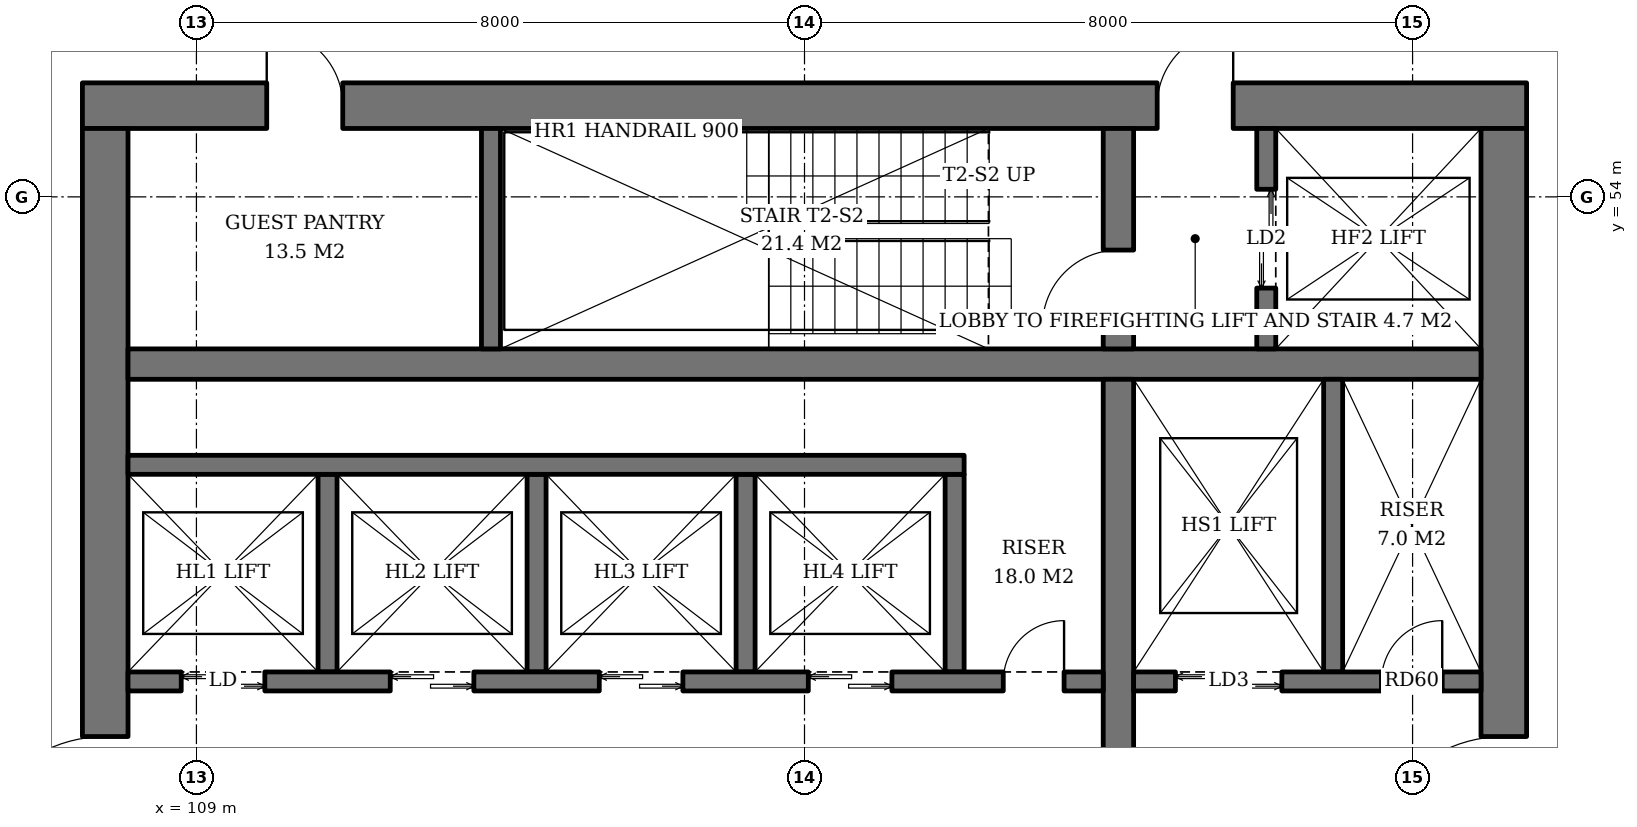
"""IFC4 building model, lengths in metres.
Left out: names, types, materials, properties, quantities, classifications, styles, units other than length and angle.
Written with IfcOpenShell. Run it as: python <this file> out.ifc"""

import sys

from ifc_helpers import new_model, si_unit, direction, frame, frame_2d, origin, place, context, subcontext, project, spatial, rectangle, extrude, element, fill, save


model = new_model("IFC4")
c1 = context("Model", 3, precision=1e-05, world=origin(), true_north=direction((0.0, 1.0)))
c2 = subcontext(c1, "Body", "Model", "MODEL_VIEW")
j1 = project(units=[si_unit("LENGTHUNIT", "METRE"), si_unit("PLANEANGLEUNIT", "RADIAN")], contexts=[c1])
p1 = place(None, origin())
s1 = spatial("IfcSite", under=j1, at=p1, CompositionType="ELEMENT")
p2 = place(p1, origin())
s2 = spatial("IfcBuilding", under=s1, at=p2, CompositionType="ELEMENT")
p3 = place(p2, frame((0.0, 0.0, 119.8)))
s3 = spatial("IfcBuildingStorey", under=s2, at=p3, CompositionType="ELEMENT", Elevation=119.8)
p4 = place(p3, frame((107.5, 55.2, 0.0), z_axis=(0.0, 0.0, 1.0), x_axis=(1.0, 0.0, 0.0)))
e1 = element("IfcWall", 1, at=p4, inside=s3, PredefinedType="SHEAR", context=c2, shape_type="SweptSolid", body=[
    extrude(rectangle(XDim=19.0, YDim=0.6, at=frame_2d((9.5, 0.0))), origin(), (0.0, 0.0, 1.0), 3.8),
])
p5 = place(p4, frame((14.14, 0.0, 0.0)))
e2 = element("IfcOpeningElement", 2, at=p5, cuts=e1, PredefinedType="OPENING", context=c2, shape_type="SweptSolid", body=[
    extrude(rectangle(XDim=1.0, YDim=2.1, at=frame_2d((0.5, 1.05))), frame((0.0, 0.31, 0.0), z_axis=(0.0, -1.0, 0.0), x_axis=(1.0, 0.0, 0.0)), (0.0, 0.0, 1.0), 0.62),
])
p6 = place(p4, frame((2.425, 0.0, 0.0)))
e3 = element("IfcOpeningElement", 3, at=p6, cuts=e1, PredefinedType="OPENING", context=c2, shape_type="SweptSolid", body=[
    extrude(rectangle(XDim=1.0, YDim=2.1, at=frame_2d((0.5, 1.05))), frame((0.0, 0.31, 0.0), z_axis=(0.0, -1.0, 0.0), x_axis=(1.0, 0.0, 0.0)), (0.0, 0.0, 1.0), 0.62),
])
p7 = place(p3, frame((107.8, 37.1, 0.0), z_axis=(0.0, 0.0, 1.0), x_axis=(0.0, 1.0, 0.0)))
e4 = element("IfcWall", 4, at=p7, inside=s3, PredefinedType="SHEAR", context=c2, shape_type="SweptSolid", body=[
    extrude(rectangle(XDim=17.8, YDim=0.6, at=frame_2d((8.9, 0.0))), origin(), (0.0, 0.0, 1.0), 3.8),
])
p8 = place(p7, frame((8.0, 0.0, 0.0)))
e5 = element("IfcOpeningElement", 5, at=p8, cuts=e4, PredefinedType="OPENING", context=c2, shape_type="SweptSolid", body=[
    extrude(rectangle(XDim=1.8, YDim=2.4, at=frame_2d((0.9, 1.2))), frame((0.0, 0.31, 0.0), z_axis=(0.0, -1.0, 0.0), x_axis=(1.0, 0.0, 0.0)), (0.0, 0.0, 1.0), 0.62),
])
p9 = place(p3, frame((126.2, 37.1, 0.0), z_axis=(0.0, 0.0, 1.0), x_axis=(0.0, 1.0, 0.0)))
e6 = element("IfcWall", 6, at=p9, inside=s3, PredefinedType="SHEAR", context=c2, shape_type="SweptSolid", body=[
    extrude(rectangle(XDim=17.8, YDim=0.6, at=frame_2d((8.9, 0.0))), origin(), (0.0, 0.0, 1.0), 3.8),
])
p10 = place(p9, frame((8.0, 0.0, 0.0)))
e7 = element("IfcOpeningElement", 7, at=p10, cuts=e6, PredefinedType="OPENING", context=c2, shape_type="SweptSolid", body=[
    extrude(rectangle(XDim=1.8, YDim=2.4, at=frame_2d((0.9, 1.2))), frame((0.0, 0.31, 0.0), z_axis=(0.0, -1.0, 0.0), x_axis=(1.0, 0.0, 0.0)), (0.0, 0.0, 1.0), 0.62),
])
p11 = place(p3, frame((108.1, 51.8, 0.0), z_axis=(0.0, 0.0, 1.0), x_axis=(1.0, 0.0, 0.0)))
e8 = element("IfcWall", 8, at=p11, inside=s3, PredefinedType="SHEAR", context=c2, shape_type="SweptSolid", body=[
    extrude(rectangle(XDim=17.8, YDim=0.4, at=frame_2d((8.9, 0.0))), origin(), (0.0, 0.0, 1.0), 3.8),
])
p12 = place(p3, frame((121.13, 40.4, 0.0), z_axis=(0.0, 0.0, 1.0), x_axis=(0.0, 1.0, 0.0)))
e9 = element("IfcWall", 9, at=p12, inside=s3, PredefinedType="SHEAR", context=c2, shape_type="SweptSolid", body=[
    extrude(rectangle(XDim=11.2, YDim=0.4, at=frame_2d((5.6, 0.0))), origin(), (0.0, 0.0, 1.0), 3.8),
])
p13 = place(p3, frame((121.13, 52.0, 0.0), z_axis=(0.0, 0.0, 1.0), x_axis=(0.0, 1.0, 0.0)))
e10 = element("IfcWall", 10, at=p13, inside=s3, PredefinedType="SHEAR", context=c2, shape_type="SweptSolid", body=[
    extrude(rectangle(XDim=2.9, YDim=0.4, at=frame_2d((1.45, 0.0))), origin(), (0.0, 0.0, 1.0), 3.8),
])
p14 = place(p13, frame((0.3, 0.0, 0.0)))
e11 = element("IfcOpeningElement", 11, at=p14, cuts=e10, PredefinedType="OPENING", context=c2, shape_type="SweptSolid", body=[
    extrude(rectangle(XDim=1.0, YDim=2.1, at=frame_2d((0.5, 1.05))), frame((0.0, 0.21, 0.0), z_axis=(0.0, -1.0, 0.0), x_axis=(1.0, 0.0, 0.0)), (0.0, 0.0, 1.0), 0.42),
])
p15 = place(p3, frame((112.875, 52.0, 0.0), z_axis=(0.0, 0.0, 1.0), x_axis=(0.0, 1.0, 0.0)))
e12 = element("IfcWall", 12, at=p15, inside=s3, PredefinedType="SHEAR", context=c2, shape_type="SweptSolid", body=[
    extrude(rectangle(XDim=2.9, YDim=0.25, at=frame_2d((1.45, 0.0))), origin(), (0.0, 0.0, 1.0), 3.8),
])
p16 = place(p3, frame((123.075, 52.0, 0.0), z_axis=(0.0, 0.0, 1.0), x_axis=(0.0, 1.0, 0.0)))
e13 = element("IfcWall", 13, at=p16, inside=s3, PredefinedType="SHEAR", context=c2, shape_type="SweptSolid", body=[
    extrude(rectangle(XDim=2.9, YDim=0.25, at=frame_2d((1.45, 0.0))), origin(), (0.0, 0.0, 1.0), 3.8),
])
p17 = place(p16, frame((0.8, 0.0, 0.0)))
e14 = element("IfcOpeningElement", 14, at=p17, cuts=e13, PredefinedType="OPENING", context=c2, shape_type="SweptSolid", body=[
    extrude(rectangle(XDim=1.3, YDim=2.2, at=frame_2d((0.65, 1.1))), frame((0.0, 0.135, 0.0), z_axis=(0.0, -1.0, 0.0), x_axis=(1.0, 0.0, 0.0)), (0.0, 0.0, 1.0), 0.27),
])
for number, where, z_axis, x_axis in (
    (15, (110.725, 47.75, 0.0), (0.0, 0.0, 1.0), (0.0, 1.0, 0.0)),
    (16, (113.475, 47.75, 0.0), (0.0, 0.0, 1.0), (0.0, 1.0, 0.0)),
    (17, (116.225, 47.75, 0.0), (0.0, 0.0, 1.0), (0.0, 1.0, 0.0)),
    (18, (118.975, 47.75, 0.0), (0.0, 0.0, 1.0), (0.0, 1.0, 0.0)),
):
    element("IfcWall", number, at=place(p3, frame(where, z_axis=z_axis, x_axis=x_axis)), inside=s3, PredefinedType="SHEAR", context=c2, shape_type="SweptSolid", body=[
        extrude(rectangle(XDim=2.6, YDim=0.25, at=frame_2d((1.3, 0.0))), origin(), (0.0, 0.0, 1.0), 3.8),
    ])
p18 = place(p3, frame((108.1, 50.475, 0.0), z_axis=(0.0, 0.0, 1.0), x_axis=(1.0, 0.0, 0.0)))
e19 = element("IfcWall", 19, at=p18, inside=s3, PredefinedType="SHEAR", context=c2, shape_type="SweptSolid", body=[
    extrude(rectangle(XDim=11.0, YDim=0.25, at=frame_2d((5.5, 0.0))), origin(), (0.0, 0.0, 1.0), 3.8),
])
p19 = place(p3, frame((108.1, 47.625, 0.0), z_axis=(0.0, 0.0, 1.0), x_axis=(1.0, 0.0, 0.0)))
e20 = element("IfcWall", 20, at=p19, inside=s3, PredefinedType="SHEAR", context=c2, shape_type="SweptSolid", body=[
    extrude(rectangle(XDim=12.83, YDim=0.25, at=frame_2d((6.415, 0.0))), origin(), (0.0, 0.0, 1.0), 3.8),
])
p20 = place(p19, frame((0.7, 0.0, 0.0)))
e21 = element("IfcOpeningElement", 21, at=p20, cuts=e20, PredefinedType="OPENING", context=c2, shape_type="SweptSolid", body=[
    extrude(rectangle(XDim=1.1, YDim=2.2, at=frame_2d((0.55, 1.1))), frame((0.0, 0.135, 0.0), z_axis=(0.0, -1.0, 0.0), x_axis=(1.0, 0.0, 0.0)), (0.0, 0.0, 1.0), 0.27),
])
p21 = place(p19, frame((3.45, 0.0, 0.0)))
e22 = element("IfcOpeningElement", 22, at=p21, cuts=e20, PredefinedType="OPENING", context=c2, shape_type="SweptSolid", body=[
    extrude(rectangle(XDim=1.1, YDim=2.2, at=frame_2d((0.55, 1.1))), frame((0.0, 0.135, 0.0), z_axis=(0.0, -1.0, 0.0), x_axis=(1.0, 0.0, 0.0)), (0.0, 0.0, 1.0), 0.27),
])
p22 = place(p19, frame((6.2, 0.0, 0.0)))
e23 = element("IfcOpeningElement", 23, at=p22, cuts=e20, PredefinedType="OPENING", context=c2, shape_type="SweptSolid", body=[
    extrude(rectangle(XDim=1.1, YDim=2.2, at=frame_2d((0.55, 1.1))), frame((0.0, 0.135, 0.0), z_axis=(0.0, -1.0, 0.0), x_axis=(1.0, 0.0, 0.0)), (0.0, 0.0, 1.0), 0.27),
])
p23 = place(p19, frame((8.95, 0.0, 0.0)))
e24 = element("IfcOpeningElement", 24, at=p23, cuts=e20, PredefinedType="OPENING", context=c2, shape_type="SweptSolid", body=[
    extrude(rectangle(XDim=1.1, YDim=2.2, at=frame_2d((0.55, 1.1))), frame((0.0, 0.135, 0.0), z_axis=(0.0, -1.0, 0.0), x_axis=(1.0, 0.0, 0.0)), (0.0, 0.0, 1.0), 0.27),
])
p24 = place(p19, frame((11.515, 0.0, 0.0)))
e25 = element("IfcOpeningElement", 25, at=p24, cuts=e20, PredefinedType="OPENING", context=c2, shape_type="SweptSolid", body=[
    extrude(rectangle(XDim=0.8, YDim=2.0, at=frame_2d((0.4, 1.0))), frame((0.0, 0.135, 0.0), z_axis=(0.0, -1.0, 0.0), x_axis=(1.0, 0.0, 0.0)), (0.0, 0.0, 1.0), 0.27),
])
p25 = place(p3, frame((123.955, 47.75, 0.0), z_axis=(0.0, 0.0, 1.0), x_axis=(0.0, 1.0, 0.0)))
e26 = element("IfcWall", 26, at=p25, inside=s3, PredefinedType="SHEAR", context=c2, shape_type="SweptSolid", body=[
    extrude(rectangle(XDim=3.85, YDim=0.25, at=frame_2d((1.925, 0.0))), origin(), (0.0, 0.0, 1.0), 3.8),
])
p26 = place(p3, frame((121.33, 47.625, 0.0), z_axis=(0.0, 0.0, 1.0), x_axis=(1.0, 0.0, 0.0)))
e27 = element("IfcWall", 27, at=p26, inside=s3, PredefinedType="SHEAR", context=c2, shape_type="SweptSolid", body=[
    extrude(rectangle(XDim=4.57, YDim=0.25, at=frame_2d((2.285, 0.0))), origin(), (0.0, 0.0, 1.0), 3.8),
])
p27 = place(p26, frame((0.55, 0.0, 0.0)))
e28 = element("IfcOpeningElement", 28, at=p27, cuts=e27, PredefinedType="OPENING", context=c2, shape_type="SweptSolid", body=[
    extrude(rectangle(XDim=1.4, YDim=2.4, at=frame_2d((0.7, 1.2))), frame((0.0, 0.135, 0.0), z_axis=(0.0, -1.0, 0.0), x_axis=(1.0, 0.0, 0.0)), (0.0, 0.0, 1.0), 0.27),
])
p28 = place(p26, frame((3.26, 0.0, 0.0)))
e29 = element("IfcOpeningElement", 29, at=p28, cuts=e27, PredefinedType="OPENING", context=c2, shape_type="SweptSolid", body=[
    extrude(rectangle(XDim=0.8, YDim=2.0, at=frame_2d((0.4, 1.0))), frame((0.0, 0.135, 0.0), z_axis=(0.0, -1.0, 0.0), x_axis=(1.0, 0.0, 0.0)), (0.0, 0.0, 1.0), 0.27),
])
p29 = place(p17, origin())
e30 = element("IfcDoor", 30, at=p29, inside=s3, OperationType="DOUBLE_DOOR_SLIDING", PredefinedType="DOOR", context=c2, shape_type="SweptSolid", body=[
    extrude(rectangle(XDim=1.3, YDim=2.2, at=frame_2d((0.65, 1.1))), frame((0.0, 0.025, 0.0), z_axis=(0.0, -1.0, 0.0), x_axis=(1.0, 0.0, 0.0)), (0.0, 0.0, 1.0), 0.05),
])
fill(e14, e30)
p30 = place(p20, origin())
e31 = element("IfcDoor", 31, at=p30, inside=s3, OperationType="DOUBLE_DOOR_SLIDING", PredefinedType="DOOR", context=c2, shape_type="SweptSolid", body=[
    extrude(rectangle(XDim=1.1, YDim=2.2, at=frame_2d((0.55, 1.1))), frame((0.0, 0.025, 0.0), z_axis=(0.0, -1.0, 0.0), x_axis=(1.0, 0.0, 0.0)), (0.0, 0.0, 1.0), 0.05),
])
fill(e21, e31)
p31 = place(p21, origin())
e32 = element("IfcDoor", 32, at=p31, inside=s3, OperationType="DOUBLE_DOOR_SLIDING", PredefinedType="DOOR", context=c2, shape_type="SweptSolid", body=[
    extrude(rectangle(XDim=1.1, YDim=2.2, at=frame_2d((0.55, 1.1))), frame((0.0, 0.025, 0.0), z_axis=(0.0, -1.0, 0.0), x_axis=(1.0, 0.0, 0.0)), (0.0, 0.0, 1.0), 0.05),
])
fill(e22, e32)
p32 = place(p22, origin())
e33 = element("IfcDoor", 33, at=p32, inside=s3, OperationType="DOUBLE_DOOR_SLIDING", PredefinedType="DOOR", context=c2, shape_type="SweptSolid", body=[
    extrude(rectangle(XDim=1.1, YDim=2.2, at=frame_2d((0.55, 1.1))), frame((0.0, 0.025, 0.0), z_axis=(0.0, -1.0, 0.0), x_axis=(1.0, 0.0, 0.0)), (0.0, 0.0, 1.0), 0.05),
])
fill(e23, e33)
p33 = place(p23, origin())
e34 = element("IfcDoor", 34, at=p33, inside=s3, OperationType="DOUBLE_DOOR_SLIDING", PredefinedType="DOOR", context=c2, shape_type="SweptSolid", body=[
    extrude(rectangle(XDim=1.1, YDim=2.2, at=frame_2d((0.55, 1.1))), frame((0.0, 0.025, 0.0), z_axis=(0.0, -1.0, 0.0), x_axis=(1.0, 0.0, 0.0)), (0.0, 0.0, 1.0), 0.05),
])
fill(e24, e34)
p34 = place(p24, origin())
e35 = element("IfcDoor", 35, at=p34, inside=s3, OperationType="SINGLE_SWING_RIGHT", PredefinedType="DOOR", context=c2, shape_type="SweptSolid", body=[
    extrude(rectangle(XDim=0.8, YDim=2.0, at=frame_2d((0.4, 1.0))), frame((0.0, 0.025, 0.0), z_axis=(0.0, -1.0, 0.0), x_axis=(1.0, 0.0, 0.0)), (0.0, 0.0, 1.0), 0.05),
])
fill(e25, e35)
p35 = place(p27, origin())
e36 = element("IfcDoor", 36, at=p35, inside=s3, OperationType="DOUBLE_DOOR_SLIDING", PredefinedType="DOOR", context=c2, shape_type="SweptSolid", body=[
    extrude(rectangle(XDim=1.4, YDim=2.4, at=frame_2d((0.7, 1.2))), frame((0.0, 0.025, 0.0), z_axis=(0.0, -1.0, 0.0), x_axis=(1.0, 0.0, 0.0)), (0.0, 0.0, 1.0), 0.05),
])
fill(e28, e36)
p36 = place(p28, origin())
e37 = element("IfcDoor", 37, at=p36, inside=s3, OperationType="SINGLE_SWING_RIGHT", PredefinedType="DOOR", context=c2, shape_type="SweptSolid", body=[
    extrude(rectangle(XDim=0.8, YDim=2.0, at=frame_2d((0.4, 1.0))), frame((0.0, 0.025, 0.0), z_axis=(0.0, -1.0, 0.0), x_axis=(1.0, 0.0, 0.0)), (0.0, 0.0, 1.0), 0.05),
])
fill(e29, e37)
p37 = place(p14, origin())
e38 = element("IfcDoor", 38, at=p37, inside=s3, OperationType="SINGLE_SWING_LEFT", PredefinedType="DOOR", context=c2, shape_type="SweptSolid", body=[
    extrude(rectangle(XDim=1.0, YDim=2.1, at=frame_2d((0.5, 1.05))), frame((0.0, 0.025, 0.0), z_axis=(0.0, -1.0, 0.0), x_axis=(1.0, 0.0, 0.0)), (0.0, 0.0, 1.0), 0.05),
])
fill(e11, e38)
p38 = place(p5, origin())
e39 = element("IfcDoor", 39, at=p38, inside=s3, OperationType="SINGLE_SWING_RIGHT", PredefinedType="DOOR", context=c2, shape_type="SweptSolid", body=[
    extrude(rectangle(XDim=1.0, YDim=2.1, at=frame_2d((0.5, 1.05))), frame((0.0, 0.025, 0.0), z_axis=(0.0, -1.0, 0.0), x_axis=(1.0, 0.0, 0.0)), (0.0, 0.0, 1.0), 0.05),
])
fill(e2, e39)
p39 = place(p8, origin())
e40 = element("IfcDoor", 40, at=p39, inside=s3, OperationType="DOUBLE_DOOR_SINGLE_SWING", PredefinedType="DOOR", context=c2, shape_type="SweptSolid", body=[
    extrude(rectangle(XDim=1.8, YDim=2.4, at=frame_2d((0.9, 1.2))), frame((0.0, 0.025, 0.0), z_axis=(0.0, -1.0, 0.0), x_axis=(1.0, 0.0, 0.0)), (0.0, 0.0, 1.0), 0.05),
])
fill(e5, e40)
p40 = place(p10, origin())
e41 = element("IfcDoor", 41, at=p40, inside=s3, OperationType="DOUBLE_DOOR_SINGLE_SWING", PredefinedType="DOOR", context=c2, shape_type="SweptSolid", body=[
    extrude(rectangle(XDim=1.8, YDim=2.4, at=frame_2d((0.9, 1.2))), frame((0.0, 0.025, 0.0), z_axis=(0.0, -1.0, 0.0), x_axis=(1.0, 0.0, 0.0)), (0.0, 0.0, 1.0), 0.05),
])
fill(e7, e41)
p41 = place(p6, origin())
e42 = element("IfcDoor", 42, at=p41, inside=s3, OperationType="SINGLE_SWING_LEFT", PredefinedType="DOOR", context=c2, shape_type="SweptSolid", body=[
    extrude(rectangle(XDim=1.0, YDim=2.1, at=frame_2d((0.5, 1.05))), frame((0.0, -0.24, 0.0), z_axis=(0.0, -1.0, 0.0), x_axis=(1.0, 0.0, 0.0)), (0.0, 0.0, 1.0), 0.05),
])
fill(e3, e42)
save(model, sys.argv[1])
